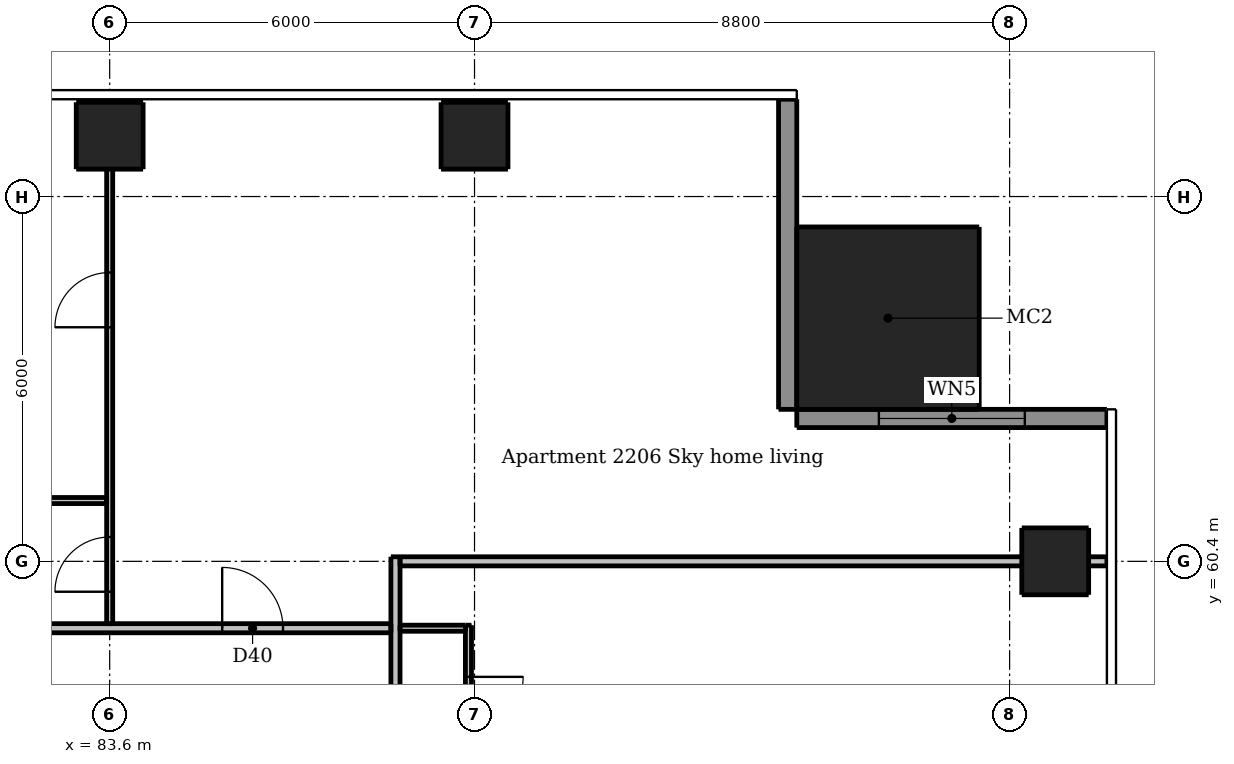
"""IFC4 building model, lengths in metres.
Left out: names, types, materials, properties, quantities, classifications, styles, units other than length and angle.
Written with IfcOpenShell. Run it as: python <this file> out.ifc"""

import sys

from ifc_helpers import new_model, si_unit, direction, frame, frame_2d, origin, origin_2d, place, context, subcontext, project, spatial, rectangle, extrude, element, fill, save


model = new_model("IFC4")
c1 = context("Model", 3, precision=1e-05, world=origin(), true_north=direction((0.0, 1.0)))
c2 = subcontext(c1, "Body", "Model", "MODEL_VIEW")
j1 = project(units=[si_unit("LENGTHUNIT", "METRE"), si_unit("PLANEANGLEUNIT", "RADIAN")], contexts=[c1])
p1 = place(None, origin())
s1 = spatial("IfcSite", under=j1, at=p1, CompositionType="ELEMENT")
p2 = place(p1, origin())
s2 = spatial("IfcBuilding", under=s1, at=p2, CompositionType="ELEMENT")
p3 = place(p2, frame((0.0, 0.0, 85.3)))
s3 = spatial("IfcBuildingStorey", under=s2, at=p3, CompositionType="ELEMENT", Elevation=85.3)
for number, where, z_axis, x_axis in (
    (1, (99.15, 60.4, 0.0), (0.0, 0.0, 1.0), (1.0, 0.0, 0.0)),
    (2, (83.6, 67.4, 0.0), (0.0, 0.0, 1.0), (1.0, 0.0, 0.0)),
    (3, (89.6, 67.4, 0.0), (0.0, 0.0, 1.0), (1.0, 0.0, 0.0)),
):
    element("IfcColumn", number, at=place(p3, frame(where, z_axis=z_axis, x_axis=x_axis)), inside=s3, PredefinedType="COLUMN", context=c2, shape_type="SweptSolid", body=[
        extrude(rectangle(XDim=1.1, YDim=1.1, at=origin_2d()), origin(), (0.0, 0.0, 1.0), 3.05),
    ])
p4 = place(p3, frame((96.4, 64.4, 0.0), z_axis=(0.0, 0.0, 1.0), x_axis=(1.0, 0.0, 0.0)))
e4 = element("IfcColumn", 4, at=p4, inside=s3, PredefinedType="COLUMN", context=c2, shape_type="SweptSolid", body=[
    extrude(rectangle(XDim=3.0, YDim=3.0, at=origin_2d()), origin(), (0.0, 0.0, 1.0), 3.3),
])
p5 = place(p3, frame((100.0, 62.75, 0.0), z_axis=(0.0, 0.0, 1.0), x_axis=(-1.0, 0.0, 0.0)))
e5 = element("IfcWall", 5, at=p5, inside=s3, PredefinedType="SOLIDWALL", context=c2, shape_type="SweptSolid", body=[
    extrude(rectangle(XDim=5.1, YDim=0.3, at=frame_2d((2.55, 0.0))), origin(), (0.0, 0.0, 1.0), 3.05),
])
p6 = place(p5, frame((1.35, 0.0, 0.15)))
e6 = element("IfcOpeningElement", 6, at=p6, cuts=e5, PredefinedType="OPENING", context=c2, shape_type="SweptSolid", body=[
    extrude(rectangle(XDim=2.4, YDim=2.1, at=frame_2d((1.2, 1.05))), frame((0.0, 0.16, 0.0), z_axis=(0.0, -1.0, 0.0), x_axis=(1.0, 0.0, 0.0)), (0.0, 0.0, 1.0), 0.32),
])
p7 = place(p3, frame((94.75, 62.9, 0.0), z_axis=(0.0, 0.0, 1.0), x_axis=(0.0, 1.0, 0.0)))
e7 = element("IfcWall", 7, at=p7, inside=s3, PredefinedType="SOLIDWALL", context=c2, shape_type="SweptSolid", body=[
    extrude(rectangle(XDim=5.1, YDim=0.3, at=frame_2d((2.55, 0.0))), origin(), (0.0, 0.0, 1.0), 3.05),
])
p8 = place(p3, frame((83.6, 59.375, 0.0), z_axis=(0.0, 0.0, 1.0), x_axis=(0.0, 1.0, 0.0)))
e8 = element("IfcWall", 8, at=p8, inside=s3, PredefinedType="PARTITIONING", context=c2, shape_type="SweptSolid", body=[
    extrude(rectangle(XDim=8.625, YDim=0.1, at=frame_2d((4.312, 0.0))), origin(), (0.0, 0.0, 1.0), 2.516),
])
p9 = place(p8, frame((0.525, 0.0, 0.0)))
e9 = element("IfcOpeningElement", 9, at=p9, cuts=e8, PredefinedType="OPENING", context=c2, shape_type="SweptSolid", body=[
    extrude(rectangle(XDim=0.9, YDim=2.1, at=frame_2d((0.45, 1.05))), frame((0.0, 0.06, 0.0), z_axis=(0.0, -1.0, 0.0), x_axis=(1.0, 0.0, 0.0)), (0.0, 0.0, 1.0), 0.12),
])
p10 = place(p8, frame((4.875, 0.0, 0.0)))
e10 = element("IfcOpeningElement", 10, at=p10, cuts=e8, PredefinedType="OPENING", context=c2, shape_type="SweptSolid", body=[
    extrude(rectangle(XDim=0.9, YDim=2.1, at=frame_2d((0.45, 1.05))), frame((0.0, 0.06, 0.0), z_axis=(0.0, -1.0, 0.0), x_axis=(1.0, 0.0, 0.0)), (0.0, 0.0, 1.0), 0.12),
])
p11 = place(p3, frame((89.5, 59.35, 0.0), z_axis=(0.0, 0.0, 1.0), x_axis=(0.0, -1.0, 0.0)))
e11 = element("IfcWall", 11, at=p11, inside=s3, PredefinedType="PARTITIONING", context=c2, shape_type="SweptSolid", body=[
    extrude(rectangle(XDim=19.775, YDim=0.1, at=frame_2d((9.888, 0.0))), origin(), (0.0, 0.0, 1.0), 2.51),
])
p12 = place(p11, frame((14.95, 0.0, 0.0)))
e12 = element("IfcOpeningElement", 12, at=p12, cuts=e11, PredefinedType="OPENING", context=c2, shape_type="SweptSolid", body=[
    extrude(rectangle(XDim=0.9, YDim=2.1, at=frame_2d((0.45, 1.05))), frame((0.0, 0.06, 0.0), z_axis=(0.0, -1.0, 0.0), x_axis=(1.0, 0.0, 0.0)), (0.0, 0.0, 1.0), 0.12),
])
p13 = place(p11, frame((9.0, 0.0, 0.0)))
e13 = element("IfcOpeningElement", 13, at=p13, cuts=e11, PredefinedType="OPENING", context=c2, shape_type="SweptSolid", body=[
    extrude(rectangle(XDim=0.9, YDim=2.1, at=frame_2d((0.45, 1.05))), frame((0.0, 0.06, 0.0), z_axis=(0.0, -1.0, 0.0), x_axis=(1.0, 0.0, 0.0)), (0.0, 0.0, 1.0), 0.12),
])
p14 = place(p11, frame((11.4, 0.0, 0.0)))
e14 = element("IfcOpeningElement", 14, at=p14, cuts=e11, PredefinedType="OPENING", context=c2, shape_type="SweptSolid", body=[
    extrude(rectangle(XDim=0.9, YDim=2.1, at=frame_2d((0.45, 1.05))), frame((0.0, 0.06, 0.0), z_axis=(0.0, -1.0, 0.0), x_axis=(1.0, 0.0, 0.0)), (0.0, 0.0, 1.0), 0.12),
])
p15 = place(p11, frame((18.5, 0.0, 0.0)))
e15 = element("IfcOpeningElement", 15, at=p15, cuts=e11, PredefinedType="OPENING", context=c2, shape_type="SweptSolid", body=[
    extrude(rectangle(XDim=0.9, YDim=2.1, at=frame_2d((0.45, 1.05))), frame((0.0, 0.06, 0.0), z_axis=(0.0, -1.0, 0.0), x_axis=(1.0, 0.0, 0.0)), (0.0, 0.0, 1.0), 0.12),
])
p16 = place(p11, frame((6.0, 0.0, 0.0)))
e16 = element("IfcOpeningElement", 16, at=p16, cuts=e11, PredefinedType="OPENING", context=c2, shape_type="SweptSolid", body=[
    extrude(rectangle(XDim=0.9, YDim=2.1, at=frame_2d((0.45, 1.05))), frame((0.0, 0.06, 0.0), z_axis=(0.0, -1.0, 0.0), x_axis=(1.0, 0.0, 0.0)), (0.0, 0.0, 1.0), 0.12),
])
p17 = place(p11, frame((0.85, 0.0, 0.0)))
e17 = element("IfcOpeningElement", 17, at=p17, cuts=e11, PredefinedType="OPENING", context=c2, shape_type="SweptSolid", body=[
    extrude(rectangle(XDim=0.9, YDim=2.1, at=frame_2d((0.45, 1.05))), frame((0.0, 0.06, 0.0), z_axis=(0.0, -1.0, 0.0), x_axis=(1.0, 0.0, 0.0)), (0.0, 0.0, 1.0), 0.12),
])
p18 = place(p11, frame((3.35, 0.0, 0.0)))
e18 = element("IfcOpeningElement", 18, at=p18, cuts=e11, PredefinedType="OPENING", context=c2, shape_type="SweptSolid", body=[
    extrude(rectangle(XDim=0.8, YDim=2.1, at=frame_2d((0.4, 1.05))), frame((0.0, 0.06, 0.0), z_axis=(0.0, -1.0, 0.0), x_axis=(1.0, 0.0, 0.0)), (0.0, 0.0, 1.0), 0.12),
])
p19 = place(p3, frame((83.55, 61.4, 0.0), z_axis=(0.0, 0.0, 1.0), x_axis=(-1.0, 0.0, 0.0)))
e19 = element("IfcWall", 19, at=p19, inside=s3, PredefinedType="PARTITIONING", context=c2, shape_type="SweptSolid", body=[
    extrude(rectangle(XDim=5.875, YDim=0.1, at=frame_2d((2.938, 0.0))), origin(), (0.0, 0.0, 1.0), 3.05),
])
p20 = place(p19, frame((3.75, 0.0, 0.0)))
e20 = element("IfcOpeningElement", 20, at=p20, cuts=e19, PredefinedType="OPENING", context=c2, shape_type="SweptSolid", body=[
    extrude(rectangle(XDim=0.8, YDim=2.1, at=frame_2d((0.4, 1.05))), frame((0.0, 0.06, 0.0), z_axis=(0.0, -1.0, 0.0), x_axis=(1.0, 0.0, 0.0)), (0.0, 0.0, 1.0), 0.12),
])
p21 = place(p3, frame((88.375, 59.3, 0.0), z_axis=(0.0, 0.0, 1.0), x_axis=(1.0, 0.0, 0.0)))
e21 = element("IfcWall", 21, at=p21, inside=s3, PredefinedType="PARTITIONING", context=c2, shape_type="SweptSolid", body=[
    extrude(rectangle(XDim=1.075, YDim=0.1, at=frame_2d((0.538, 0.0))), origin(), (0.0, 0.0, 1.0), 3.05),
])
p22 = place(p3, frame((88.3, 60.475, 0.0), z_axis=(0.0, 0.0, 1.0), x_axis=(0.0, -1.0, 0.0)))
e22 = element("IfcWall", 22, at=p22, inside=s3, PredefinedType="PARTITIONING", context=c2, shape_type="SweptSolid", body=[
    extrude(rectangle(XDim=28.7, YDim=0.15, at=frame_2d((14.35, 0.0))), origin(), (0.0, 0.0, 1.0), 3.05),
])
p23 = place(p22, frame((27.425, 0.0, 0.0)))
e23 = element("IfcOpeningElement", 23, at=p23, cuts=e22, PredefinedType="OPENING", context=c2, shape_type="SweptSolid", body=[
    extrude(rectangle(XDim=1.0, YDim=2.1, at=frame_2d((0.5, 1.05))), frame((0.0, 0.085, 0.0), z_axis=(0.0, -1.0, 0.0), x_axis=(1.0, 0.0, 0.0)), (0.0, 0.0, 1.0), 0.17),
])
p24 = place(p22, frame((10.575, 0.0, 0.0)))
e24 = element("IfcOpeningElement", 24, at=p24, cuts=e22, PredefinedType="OPENING", context=c2, shape_type="SweptSolid", body=[
    extrude(rectangle(XDim=1.0, YDim=2.1, at=frame_2d((0.5, 1.05))), frame((0.0, 0.085, 0.0), z_axis=(0.0, -1.0, 0.0), x_axis=(1.0, 0.0, 0.0)), (0.0, 0.0, 1.0), 0.17),
])
p25 = place(p3, frame((88.375, 60.4, 0.0), z_axis=(0.0, 0.0, 1.0), x_axis=(1.0, 0.0, 0.0)))
e25 = element("IfcWall", 25, at=p25, inside=s3, PredefinedType="PARTITIONING", context=c2, shape_type="SweptSolid", body=[
    extrude(rectangle(XDim=11.625, YDim=0.15, at=frame_2d((5.812, 0.0))), origin(), (0.0, 0.0, 1.0), 2.516),
])
p26 = place(p3, frame((59.675, 59.3, 0.0), z_axis=(0.0, 0.0, 1.0), x_axis=(1.0, 0.0, 0.0)))
e26 = element("IfcWall", 26, at=p26, inside=s3, PredefinedType="PARTITIONING", context=c2, shape_type="SweptSolid", body=[
    extrude(rectangle(XDim=28.55, YDim=0.15, at=frame_2d((14.275, 0.0))), origin(), (0.0, 0.0, 1.0), 3.05),
])
p27 = place(p26, frame((8.975, 0.0, 0.0)))
e27 = element("IfcOpeningElement", 27, at=p27, cuts=e26, PredefinedType="OPENING", context=c2, shape_type="SweptSolid", body=[
    extrude(rectangle(XDim=1.0, YDim=2.1, at=frame_2d((0.5, 1.05))), frame((0.0, 0.085, 0.0), z_axis=(0.0, -1.0, 0.0), x_axis=(1.0, 0.0, 0.0)), (0.0, 0.0, 1.0), 0.17),
])
p28 = place(p26, frame((25.775, 0.0, 0.0)))
e28 = element("IfcOpeningElement", 28, at=p28, cuts=e26, PredefinedType="OPENING", context=c2, shape_type="SweptSolid", body=[
    extrude(rectangle(XDim=1.0, YDim=2.1, at=frame_2d((0.5, 1.05))), frame((0.0, 0.085, 0.0), z_axis=(0.0, -1.0, 0.0), x_axis=(1.0, 0.0, 0.0)), (0.0, 0.0, 1.0), 0.17),
])
p29 = place(p6, origin())
e29 = element("IfcWindow", 29, at=p29, inside=s3, PartitioningType="DOUBLE_PANEL_VERTICAL", PredefinedType="WINDOW", context=c2, shape_type="SweptSolid", body=[
    extrude(rectangle(XDim=2.4, YDim=2.1, at=frame_2d((1.2, 1.05))), frame((0.0, 0.03, 0.0), z_axis=(0.0, -1.0, 0.0), x_axis=(1.0, 0.0, 0.0)), (0.0, 0.0, 1.0), 0.06),
])
fill(e6, e29)
p30 = place(p17, origin())
e30 = element("IfcDoor", 30, at=p30, inside=s3, OperationType="SINGLE_SWING_LEFT", PredefinedType="DOOR", context=c2, shape_type="SweptSolid", body=[
    extrude(rectangle(XDim=0.9, YDim=2.1, at=frame_2d((0.45, 1.05))), frame((0.0, 0.025, 0.0), z_axis=(0.0, -1.0, 0.0), x_axis=(1.0, 0.0, 0.0)), (0.0, 0.0, 1.0), 0.05),
])
fill(e17, e30)
p31 = place(p28, origin())
e31 = element("IfcDoor", 31, at=p31, inside=s3, OperationType="SINGLE_SWING_LEFT", PredefinedType="DOOR", context=c2, shape_type="SweptSolid", body=[
    extrude(rectangle(XDim=1.0, YDim=2.1, at=frame_2d((0.5, 1.05))), frame((0.0, 0.025, 0.0), z_axis=(0.0, -1.0, 0.0), x_axis=(1.0, 0.0, 0.0)), (0.0, 0.0, 1.0), 0.05),
])
fill(e28, e31)
p32 = place(p9, origin())
e32 = element("IfcDoor", 32, at=p32, inside=s3, OperationType="SINGLE_SWING_LEFT", PredefinedType="DOOR", context=c2, shape_type="SweptSolid", body=[
    extrude(rectangle(XDim=0.9, YDim=2.1, at=frame_2d((0.45, 1.05))), frame((0.0, 0.025, 0.0), z_axis=(0.0, -1.0, 0.0), x_axis=(1.0, 0.0, 0.0)), (0.0, 0.0, 1.0), 0.05),
])
fill(e9, e32)
p33 = place(p10, origin())
e33 = element("IfcDoor", 33, at=p33, inside=s3, OperationType="SINGLE_SWING_LEFT", PredefinedType="DOOR", context=c2, shape_type="SweptSolid", body=[
    extrude(rectangle(XDim=0.9, YDim=2.1, at=frame_2d((0.45, 1.05))), frame((0.0, 0.025, 0.0), z_axis=(0.0, -1.0, 0.0), x_axis=(1.0, 0.0, 0.0)), (0.0, 0.0, 1.0), 0.05),
])
fill(e10, e33)
save(model, sys.argv[1])
